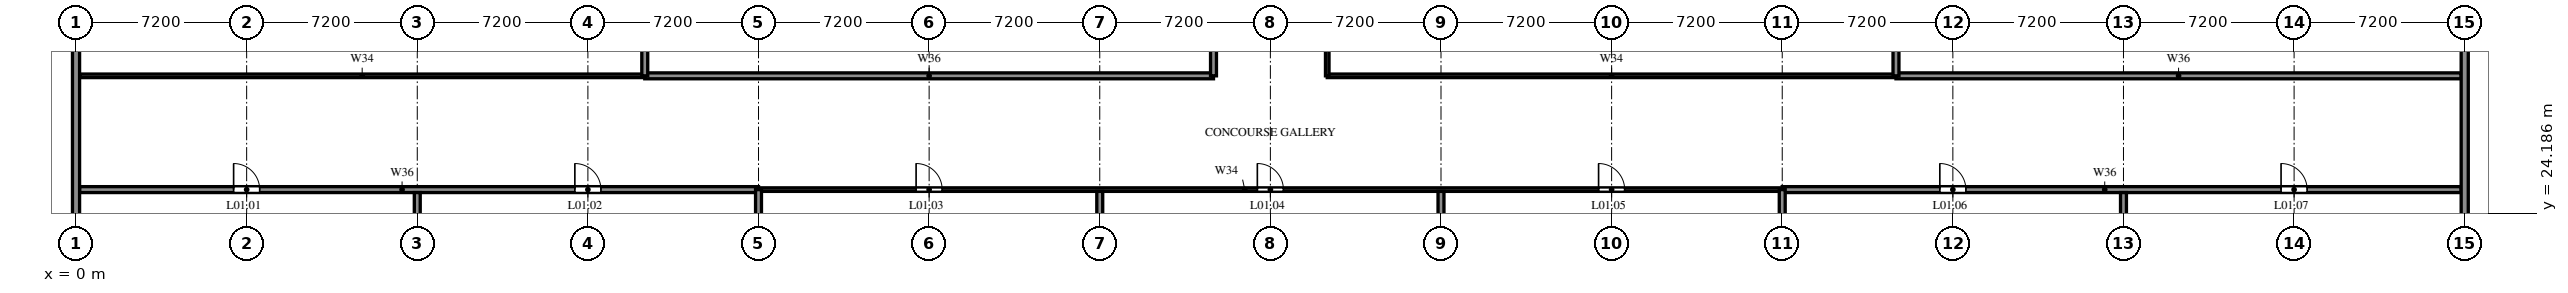
"""IFC4 building model, lengths in metres.
Left out: names, types, materials, properties, quantities, classifications, styles, units other than length and angle.
Written with IfcOpenShell. Run it as: python <this file> out.ifc"""

import sys

from ifc_helpers import new_model, si_unit, direction, frame, frame_2d, origin, place, context, subcontext, project, spatial, rectangle, extrude, element, fill, save


model = new_model("IFC4")
c1 = context("Model", 3, precision=1e-05, world=origin(), true_north=direction((0.0, 1.0)))
c2 = subcontext(c1, "Body", "Model", "MODEL_VIEW")
j1 = project(units=[si_unit("LENGTHUNIT", "METRE"), si_unit("PLANEANGLEUNIT", "RADIAN")], contexts=[c1])
p1 = place(None, origin())
s1 = spatial("IfcSite", under=j1, at=p1, CompositionType="ELEMENT")
p2 = place(p1, origin())
s2 = spatial("IfcBuilding", under=s1, at=p2, CompositionType="ELEMENT")
p3 = place(p2, frame((0.0, 0.0, 7.8)))
s3 = spatial("IfcBuildingStorey", under=s2, at=p3, CompositionType="ELEMENT", Elevation=7.8)
p4 = place(p3, frame((28.8, 25.2, 0.0), z_axis=(0.0, 0.0, 1.0), x_axis=(1.0, 0.0, 0.0)))
e1 = element("IfcWall", 1, at=p4, inside=s3, PredefinedType="PARTITIONING", context=c2, shape_type="SweptSolid", body=[
    extrude(rectangle(XDim=43.2, YDim=0.15, at=frame_2d((21.6, 0.0))), origin(), (0.0, 0.0, 1.0), 3.8),
])
p5 = place(p4, frame((6.65, 0.0, 0.0)))
e2 = element("IfcOpeningElement", 2, at=p5, cuts=e1, PredefinedType="OPENING", context=c2, shape_type="SweptSolid", body=[
    extrude(rectangle(XDim=1.1, YDim=2.1, at=frame_2d((0.55, 1.05))), frame((0.0, 0.085, 0.0), z_axis=(0.0, -1.0, 0.0), x_axis=(1.0, 0.0, 0.0)), (0.0, 0.0, 1.0), 0.17),
])
p6 = place(p4, frame((21.05, 0.0, 0.0)))
e3 = element("IfcOpeningElement", 3, at=p6, cuts=e1, PredefinedType="OPENING", context=c2, shape_type="SweptSolid", body=[
    extrude(rectangle(XDim=1.1, YDim=2.1, at=frame_2d((0.55, 1.05))), frame((0.0, 0.085, 0.0), z_axis=(0.0, -1.0, 0.0), x_axis=(1.0, 0.0, 0.0)), (0.0, 0.0, 1.0), 0.17),
])
p7 = place(p4, frame((35.45, 0.0, 0.0)))
e4 = element("IfcOpeningElement", 4, at=p7, cuts=e1, PredefinedType="OPENING", context=c2, shape_type="SweptSolid", body=[
    extrude(rectangle(XDim=1.1, YDim=2.1, at=frame_2d((0.55, 1.05))), frame((0.0, 0.085, 0.0), z_axis=(0.0, -1.0, 0.0), x_axis=(1.0, 0.0, 0.0)), (0.0, 0.0, 1.0), 0.17),
])
p8 = place(p3, frame((0.15, 25.2, 0.0), z_axis=(0.0, 0.0, 1.0), x_axis=(1.0, 0.0, 0.0)))
e5 = element("IfcWall", 5, at=p8, inside=s3, PredefinedType="SOLIDWALL", context=c2, shape_type="SweptSolid", body=[
    extrude(rectangle(XDim=28.65, YDim=0.25, at=frame_2d((14.325, 0.0))), origin(), (0.0, 0.0, 1.0), 3.8),
])
p9 = place(p8, frame((6.5, 0.0, 0.0)))
e6 = element("IfcOpeningElement", 6, at=p9, cuts=e5, PredefinedType="OPENING", context=c2, shape_type="SweptSolid", body=[
    extrude(rectangle(XDim=1.1, YDim=2.1, at=frame_2d((0.55, 1.05))), frame((0.0, 0.135, 0.0), z_axis=(0.0, -1.0, 0.0), x_axis=(1.0, 0.0, 0.0)), (0.0, 0.0, 1.0), 0.27),
])
p10 = place(p8, frame((20.9, 0.0, 0.0)))
e7 = element("IfcOpeningElement", 7, at=p10, cuts=e5, PredefinedType="OPENING", context=c2, shape_type="SweptSolid", body=[
    extrude(rectangle(XDim=1.1, YDim=2.1, at=frame_2d((0.55, 1.05))), frame((0.0, 0.135, 0.0), z_axis=(0.0, -1.0, 0.0), x_axis=(1.0, 0.0, 0.0)), (0.0, 0.0, 1.0), 0.27),
])
p11 = place(p3, frame((72.0, 25.2, 0.0), z_axis=(0.0, 0.0, 1.0), x_axis=(1.0, 0.0, 0.0)))
e8 = element("IfcWall", 8, at=p11, inside=s3, PredefinedType="SOLIDWALL", context=c2, shape_type="SweptSolid", body=[
    extrude(rectangle(XDim=28.65, YDim=0.25, at=frame_2d((14.325, 0.0))), origin(), (0.0, 0.0, 1.0), 3.8),
])
p12 = place(p11, frame((6.65, 0.0, 0.0)))
e9 = element("IfcOpeningElement", 9, at=p12, cuts=e8, PredefinedType="OPENING", context=c2, shape_type="SweptSolid", body=[
    extrude(rectangle(XDim=1.1, YDim=2.1, at=frame_2d((0.55, 1.05))), frame((0.0, 0.135, 0.0), z_axis=(0.0, -1.0, 0.0), x_axis=(1.0, 0.0, 0.0)), (0.0, 0.0, 1.0), 0.27),
])
p13 = place(p11, frame((21.05, 0.0, 0.0)))
e10 = element("IfcOpeningElement", 10, at=p13, cuts=e8, PredefinedType="OPENING", context=c2, shape_type="SweptSolid", body=[
    extrude(rectangle(XDim=1.1, YDim=2.1, at=frame_2d((0.55, 1.05))), frame((0.0, 0.135, 0.0), z_axis=(0.0, -1.0, 0.0), x_axis=(1.0, 0.0, 0.0)), (0.0, 0.0, 1.0), 0.27),
])
p14 = place(p3, frame((0.15, 30.0, 0.0), z_axis=(0.0, 0.0, 1.0), x_axis=(1.0, 0.0, 0.0)))
e11 = element("IfcWall", 11, at=p14, inside=s3, PredefinedType="PARTITIONING", context=c2, shape_type="SweptSolid", body=[
    extrude(rectangle(XDim=23.85, YDim=0.15, at=frame_2d((11.925, 0.0))), origin(), (0.0, 0.0, 1.0), 3.8),
])
p15 = place(p3, frame((52.8, 30.0, 0.0), z_axis=(0.0, 0.0, 1.0), x_axis=(1.0, 0.0, 0.0)))
e12 = element("IfcWall", 12, at=p15, inside=s3, PredefinedType="PARTITIONING", context=c2, shape_type="SweptSolid", body=[
    extrude(rectangle(XDim=24.0, YDim=0.15, at=frame_2d((12.0, 0.0))), origin(), (0.0, 0.0, 1.0), 3.8),
])
p16 = place(p3, frame((24.0, 30.0, 0.0), z_axis=(0.0, 0.0, 1.0), x_axis=(1.0, 0.0, 0.0)))
e13 = element("IfcWall", 13, at=p16, inside=s3, PredefinedType="SOLIDWALL", context=c2, shape_type="SweptSolid", body=[
    extrude(rectangle(XDim=24.0, YDim=0.25, at=frame_2d((12.0, 0.0))), origin(), (0.0, 0.0, 1.0), 3.8),
])
p17 = place(p3, frame((76.8, 30.0, 0.0), z_axis=(0.0, 0.0, 1.0), x_axis=(1.0, 0.0, 0.0)))
e14 = element("IfcWall", 14, at=p17, inside=s3, PredefinedType="SOLIDWALL", context=c2, shape_type="SweptSolid", body=[
    extrude(rectangle(XDim=23.85, YDim=0.25, at=frame_2d((11.925, 0.0))), origin(), (0.0, 0.0, 1.0), 3.8),
])
p18 = place(p3, frame((0.0, 0.0, 0.0), z_axis=(0.0, 0.0, 1.0), x_axis=(0.0, 1.0, 0.0)))
e15 = element("IfcWall", 15, at=p18, inside=s3, PredefinedType="SOLIDWALL", context=c2, shape_type="SweptSolid", body=[
    extrude(rectangle(XDim=42.9, YDim=0.3, at=frame_2d((21.45, 0.0))), origin(), (0.0, 0.0, 1.0), 5.0),
])
p19 = place(p18, frame((34.65, 0.0, 0.6)))
e16 = element("IfcOpeningElement", 16, at=p19, cuts=e15, PredefinedType="OPENING", context=c2, shape_type="SweptSolid", body=[
    extrude(rectangle(XDim=1.8, YDim=2.4, at=frame_2d((0.9, 1.2))), frame((0.0, 0.16, 0.0), z_axis=(0.0, -1.0, 0.0), x_axis=(1.0, 0.0, 0.0)), (0.0, 0.0, 1.0), 0.32),
])
p20 = place(p18, frame((38.25, 0.0, 0.6)))
e17 = element("IfcOpeningElement", 17, at=p20, cuts=e15, PredefinedType="OPENING", context=c2, shape_type="SweptSolid", body=[
    extrude(rectangle(XDim=1.8, YDim=2.4, at=frame_2d((0.9, 1.2))), frame((0.0, 0.16, 0.0), z_axis=(0.0, -1.0, 0.0), x_axis=(1.0, 0.0, 0.0)), (0.0, 0.0, 1.0), 0.32),
])
p21 = place(p3, frame((14.4, 0.15, 0.0), z_axis=(0.0, 0.0, 1.0), x_axis=(0.0, 1.0, 0.0)))
e18 = element("IfcWall", 18, at=p21, inside=s3, PredefinedType="SOLIDWALL", context=c2, shape_type="SweptSolid", body=[
    extrude(rectangle(XDim=24.925, YDim=0.25, at=frame_2d((12.462, 0.0))), origin(), (0.0, 0.0, 1.0), 3.8),
])
p22 = place(p3, frame((24.0, 30.0, 0.0), z_axis=(0.0, 0.0, 1.0), x_axis=(0.0, 1.0, 0.0)))
e19 = element("IfcWall", 19, at=p22, inside=s3, PredefinedType="SOLIDWALL", context=c2, shape_type="SweptSolid", body=[
    extrude(rectangle(XDim=19.5, YDim=0.25, at=frame_2d((9.75, 0.0))), origin(), (0.0, 0.0, 1.0), 4.1),
])
p23 = place(p3, frame((28.8, 0.15, 0.0), z_axis=(0.0, 0.0, 1.0), x_axis=(0.0, 1.0, 0.0)))
e20 = element("IfcWall", 20, at=p23, inside=s3, PredefinedType="SOLIDWALL", context=c2, shape_type="SweptSolid", body=[
    extrude(rectangle(XDim=25.05, YDim=0.25, at=frame_2d((12.525, 0.0))), origin(), (0.0, 0.0, 1.0), 3.8),
])
p24 = place(p3, frame((43.2, 0.15, 0.0), z_axis=(0.0, 0.0, 1.0), x_axis=(0.0, 1.0, 0.0)))
e21 = element("IfcWall", 21, at=p24, inside=s3, PredefinedType="SOLIDWALL", context=c2, shape_type="SweptSolid", body=[
    extrude(rectangle(XDim=24.975, YDim=0.25, at=frame_2d((12.488, 0.0))), origin(), (0.0, 0.0, 1.0), 3.8),
])
p25 = place(p3, frame((48.0, 30.0, 0.0), z_axis=(0.0, 0.0, 1.0), x_axis=(0.0, 1.0, 0.0)))
e22 = element("IfcWall", 22, at=p25, inside=s3, PredefinedType="SOLIDWALL", context=c2, shape_type="SweptSolid", body=[
    extrude(rectangle(XDim=19.5, YDim=0.25, at=frame_2d((9.75, 0.0))), origin(), (0.0, 0.0, 1.0), 4.1),
])
p26 = place(p3, frame((52.8, 30.0, 0.0), z_axis=(0.0, 0.0, 1.0), x_axis=(0.0, 1.0, 0.0)))
e23 = element("IfcWall", 23, at=p26, inside=s3, PredefinedType="PARTITIONING", context=c2, shape_type="SweptSolid", body=[
    extrude(rectangle(XDim=19.5, YDim=0.15, at=frame_2d((9.75, 0.0))), origin(), (0.0, 0.0, 1.0), 4.1),
])
p27 = place(p3, frame((57.6, 0.15, 0.0), z_axis=(0.0, 0.0, 1.0), x_axis=(0.0, 1.0, 0.0)))
e24 = element("IfcWall", 24, at=p27, inside=s3, PredefinedType="SOLIDWALL", context=c2, shape_type="SweptSolid", body=[
    extrude(rectangle(XDim=24.975, YDim=0.25, at=frame_2d((12.488, 0.0))), origin(), (0.0, 0.0, 1.0), 3.8),
])
p28 = place(p3, frame((72.0, 0.15, 0.0), z_axis=(0.0, 0.0, 1.0), x_axis=(0.0, 1.0, 0.0)))
e25 = element("IfcWall", 25, at=p28, inside=s3, PredefinedType="SOLIDWALL", context=c2, shape_type="SweptSolid", body=[
    extrude(rectangle(XDim=25.05, YDim=0.25, at=frame_2d((12.525, 0.0))), origin(), (0.0, 0.0, 1.0), 3.8),
])
p29 = place(p3, frame((76.8, 30.0, 0.0), z_axis=(0.0, 0.0, 1.0), x_axis=(0.0, 1.0, 0.0)))
e26 = element("IfcWall", 26, at=p29, inside=s3, PredefinedType="SOLIDWALL", context=c2, shape_type="SweptSolid", body=[
    extrude(rectangle(XDim=19.5, YDim=0.25, at=frame_2d((9.75, 0.0))), origin(), (0.0, 0.0, 1.0), 4.1),
])
p30 = place(p3, frame((86.4, 0.15, 0.0), z_axis=(0.0, 0.0, 1.0), x_axis=(0.0, 1.0, 0.0)))
e27 = element("IfcWall", 27, at=p30, inside=s3, PredefinedType="SOLIDWALL", context=c2, shape_type="SweptSolid", body=[
    extrude(rectangle(XDim=24.925, YDim=0.25, at=frame_2d((12.462, 0.0))), origin(), (0.0, 0.0, 1.0), 3.8),
])
p31 = place(p3, frame((100.8, 0.0, 0.0), z_axis=(0.0, 0.0, 1.0), x_axis=(0.0, 1.0, 0.0)))
e28 = element("IfcWall", 28, at=p31, inside=s3, PredefinedType="SOLIDWALL", context=c2, shape_type="SweptSolid", body=[
    extrude(rectangle(XDim=42.9, YDim=0.3, at=frame_2d((21.45, 0.0))), origin(), (0.0, 0.0, 1.0), 5.0),
])
p32 = place(p9, origin())
e29 = element("IfcDoor", 29, at=p32, inside=s3, OperationType="SINGLE_SWING_LEFT", PredefinedType="DOOR", context=c2, shape_type="SweptSolid", body=[
    extrude(rectangle(XDim=1.1, YDim=2.1, at=frame_2d((0.55, 1.05))), frame((0.0, 0.025, 0.0), z_axis=(0.0, -1.0, 0.0), x_axis=(1.0, 0.0, 0.0)), (0.0, 0.0, 1.0), 0.05),
])
fill(e6, e29)
p33 = place(p10, origin())
e30 = element("IfcDoor", 30, at=p33, inside=s3, OperationType="SINGLE_SWING_RIGHT", PredefinedType="DOOR", context=c2, shape_type="SweptSolid", body=[
    extrude(rectangle(XDim=1.1, YDim=2.1, at=frame_2d((0.55, 1.05))), frame((0.0, 0.025, 0.0), z_axis=(0.0, -1.0, 0.0), x_axis=(1.0, 0.0, 0.0)), (0.0, 0.0, 1.0), 0.05),
])
fill(e7, e30)
p34 = place(p5, origin())
e31 = element("IfcDoor", 31, at=p34, inside=s3, OperationType="SINGLE_SWING_LEFT", PredefinedType="DOOR", context=c2, shape_type="SweptSolid", body=[
    extrude(rectangle(XDim=1.1, YDim=2.1, at=frame_2d((0.55, 1.05))), frame((0.0, 0.025, 0.0), z_axis=(0.0, -1.0, 0.0), x_axis=(1.0, 0.0, 0.0)), (0.0, 0.0, 1.0), 0.05),
])
fill(e2, e31)
p35 = place(p6, origin())
e32 = element("IfcDoor", 32, at=p35, inside=s3, OperationType="SINGLE_SWING_RIGHT", PredefinedType="DOOR", context=c2, shape_type="SweptSolid", body=[
    extrude(rectangle(XDim=1.1, YDim=2.1, at=frame_2d((0.55, 1.05))), frame((0.0, 0.025, 0.0), z_axis=(0.0, -1.0, 0.0), x_axis=(1.0, 0.0, 0.0)), (0.0, 0.0, 1.0), 0.05),
])
fill(e3, e32)
p36 = place(p7, origin())
e33 = element("IfcDoor", 33, at=p36, inside=s3, OperationType="SINGLE_SWING_RIGHT", PredefinedType="DOOR", context=c2, shape_type="SweptSolid", body=[
    extrude(rectangle(XDim=1.1, YDim=2.1, at=frame_2d((0.55, 1.05))), frame((0.0, 0.025, 0.0), z_axis=(0.0, -1.0, 0.0), x_axis=(1.0, 0.0, 0.0)), (0.0, 0.0, 1.0), 0.05),
])
fill(e4, e33)
p37 = place(p12, origin())
e34 = element("IfcDoor", 34, at=p37, inside=s3, OperationType="SINGLE_SWING_LEFT", PredefinedType="DOOR", context=c2, shape_type="SweptSolid", body=[
    extrude(rectangle(XDim=1.1, YDim=2.1, at=frame_2d((0.55, 1.05))), frame((0.0, 0.025, 0.0), z_axis=(0.0, -1.0, 0.0), x_axis=(1.0, 0.0, 0.0)), (0.0, 0.0, 1.0), 0.05),
])
fill(e9, e34)
p38 = place(p13, origin())
e35 = element("IfcDoor", 35, at=p38, inside=s3, OperationType="SINGLE_SWING_RIGHT", PredefinedType="DOOR", context=c2, shape_type="SweptSolid", body=[
    extrude(rectangle(XDim=1.1, YDim=2.1, at=frame_2d((0.55, 1.05))), frame((0.0, 0.025, 0.0), z_axis=(0.0, -1.0, 0.0), x_axis=(1.0, 0.0, 0.0)), (0.0, 0.0, 1.0), 0.05),
])
fill(e10, e35)
save(model, sys.argv[1])
